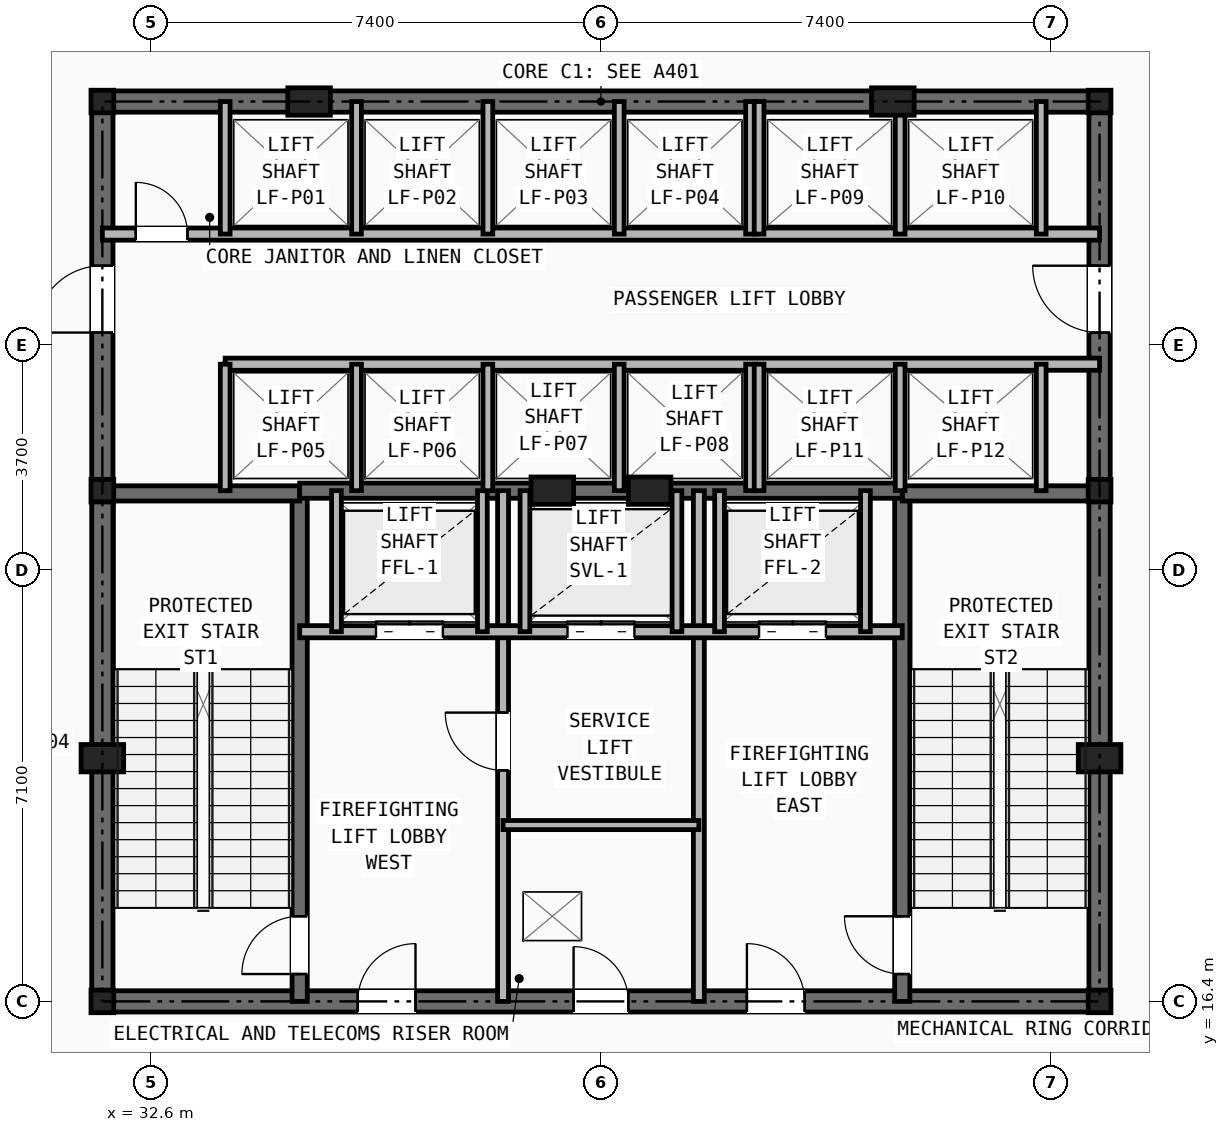
"""IFC4 building model, lengths in metres.
Left out: names, types, materials, properties, quantities, classifications, styles, units other than length and angle.
Written with IfcOpenShell. Run it as: python <this file> out.ifc"""

import sys

from ifc_helpers import new_model, si_unit, direction, frame, frame_2d, origin, origin_2d, place, context, subcontext, project, spatial, rectangle, i_section, extrude, element, fill, save


model = new_model("IFC4")
c1 = context("Model", 3, precision=1e-05, world=origin(), true_north=direction((0.0, 1.0)))
c2 = subcontext(c1, "Body", "Model", "MODEL_VIEW")
j1 = project(units=[si_unit("LENGTHUNIT", "METRE"), si_unit("PLANEANGLEUNIT", "RADIAN")], contexts=[c1])
p1 = place(None, origin())
s1 = spatial("IfcSite", under=j1, at=p1, CompositionType="ELEMENT")
p2 = place(p1, origin())
s2 = spatial("IfcBuilding", under=s1, at=p2, CompositionType="ELEMENT")
p3 = place(p2, frame((0.0, 0.0, 22.0)))
s3 = spatial("IfcBuildingStorey", under=s2, at=p3, CompositionType="ELEMENT", Elevation=22.0)
for number, where, z_axis, x_axis in (
    (1, (31.8, 16.4, 0.0), (0.0, 0.0, 1.0), (1.0, 0.0, 0.0)),
    (2, (48.2, 16.4, 0.0), (0.0, 0.0, 1.0), (1.0, 0.0, 0.0)),
    (3, (31.8, 24.8, 0.0), (0.0, 0.0, 1.0), (1.0, 0.0, 0.0)),
    (4, (48.2, 24.8, 0.0), (0.0, 0.0, 1.0), (1.0, 0.0, 0.0)),
    (5, (31.8, 31.2, 0.0), (0.0, 0.0, 1.0), (1.0, 0.0, 0.0)),
    (6, (48.2, 31.2, 0.0), (0.0, 0.0, 1.0), (1.0, 0.0, 0.0)),
):
    element("IfcColumn", number, at=place(p3, frame(where, z_axis=z_axis, x_axis=x_axis)), inside=s3, PredefinedType="COLUMN", context=c2, shape_type="SweptSolid", body=[
        extrude(i_section(OverallWidth=0.374, OverallDepth=0.372, WebThickness=0.016, FlangeThickness=0.026, at=origin_2d()), origin(), (0.0, 0.0, 1.0), 5.2),
    ])
for number, where, z_axis, x_axis in (
    (7, (31.8, 20.4, 0.0), (0.0, 0.0, 1.0), (1.0, 0.0, 0.0)),
    (8, (48.2, 20.4, 0.0), (0.0, 0.0, 1.0), (1.0, 0.0, 0.0)),
    (9, (35.2, 31.2, 0.0), (0.0, 0.0, 1.0), (1.0, 0.0, 0.0)),
    (10, (44.8, 31.2, 0.0), (0.0, 0.0, 1.0), (1.0, 0.0, 0.0)),
    (11, (39.2, 24.8, 0.0), (0.0, 0.0, 1.0), (1.0, 0.0, 0.0)),
    (12, (40.8, 24.8, 0.0), (0.0, 0.0, 1.0), (1.0, 0.0, 0.0)),
):
    element("IfcColumn", number, at=place(p3, frame(where, z_axis=z_axis, x_axis=x_axis)), inside=s3, PredefinedType="PILASTER", context=c2, shape_type="SweptSolid", body=[
        extrude(rectangle(XDim=0.7, YDim=0.45, at=origin_2d()), origin(), (0.0, 0.0, 1.0), 5.2),
    ])
p4 = place(p3, frame((31.8, 16.4, 0.0), z_axis=(0.0, 0.0, 1.0), x_axis=(1.0, 0.0, 0.0)))
e13 = element("IfcWall", 13, at=p4, inside=s3, PredefinedType="SHEAR", context=c2, shape_type="SweptSolid", body=[
    extrude(rectangle(XDim=16.4, YDim=0.35, at=frame_2d((8.2, 0.0))), origin(), (0.0, 0.0, 1.0), 4.78),
])
p5 = place(p4, frame((7.75, 0.0, 0.0)))
e14 = element("IfcOpeningElement", 14, at=p5, cuts=e13, PredefinedType="OPENING", context=c2, shape_type="SweptSolid", body=[
    extrude(rectangle(XDim=0.9, YDim=2.1, at=frame_2d((0.45, 1.05))), frame((0.0, 0.185, 0.0), z_axis=(0.0, -1.0, 0.0), x_axis=(1.0, 0.0, 0.0)), (0.0, 0.0, 1.0), 0.37),
])
p6 = place(p4, frame((4.2, 0.0, 0.0)))
e15 = element("IfcOpeningElement", 15, at=p6, cuts=e13, PredefinedType="OPENING", context=c2, shape_type="SweptSolid", body=[
    extrude(rectangle(XDim=0.95, YDim=2.1, at=frame_2d((0.475, 1.05))), frame((0.0, 0.185, 0.0), z_axis=(0.0, -1.0, 0.0), x_axis=(1.0, 0.0, 0.0)), (0.0, 0.0, 1.0), 0.37),
])
p7 = place(p4, frame((10.6, 0.0, 0.0)))
e16 = element("IfcOpeningElement", 16, at=p7, cuts=e13, PredefinedType="OPENING", context=c2, shape_type="SweptSolid", body=[
    extrude(rectangle(XDim=0.95, YDim=2.1, at=frame_2d((0.475, 1.05))), frame((0.0, 0.185, 0.0), z_axis=(0.0, -1.0, 0.0), x_axis=(1.0, 0.0, 0.0)), (0.0, 0.0, 1.0), 0.37),
])
p8 = place(p3, frame((31.8, 31.2, 0.0), z_axis=(0.0, 0.0, 1.0), x_axis=(1.0, 0.0, 0.0)))
e17 = element("IfcWall", 17, at=p8, inside=s3, PredefinedType="SHEAR", context=c2, shape_type="SweptSolid", body=[
    extrude(rectangle(XDim=16.4, YDim=0.35, at=frame_2d((8.2, 0.0))), origin(), (0.0, 0.0, 1.0), 4.78),
])
p9 = place(p3, frame((31.8, 16.4, 0.0), z_axis=(0.0, 0.0, 1.0), x_axis=(0.0, 1.0, 0.0)))
e18 = element("IfcWall", 18, at=p9, inside=s3, PredefinedType="SHEAR", context=c2, shape_type="SweptSolid", body=[
    extrude(rectangle(XDim=14.8, YDim=0.35, at=frame_2d((7.4, 0.0))), origin(), (0.0, 0.0, 1.0), 4.78),
])
p10 = place(p9, frame((11.0, 0.0, 0.0)))
e19 = element("IfcOpeningElement", 19, at=p10, cuts=e18, PredefinedType="OPENING", context=c2, shape_type="SweptSolid", body=[
    extrude(rectangle(XDim=1.1, YDim=2.15, at=frame_2d((0.55, 1.075))), frame((0.0, 0.185, 0.0), z_axis=(0.0, -1.0, 0.0), x_axis=(1.0, 0.0, 0.0)), (0.0, 0.0, 1.0), 0.37),
])
p11 = place(p3, frame((48.2, 16.4, 0.0), z_axis=(0.0, 0.0, 1.0), x_axis=(0.0, 1.0, 0.0)))
e20 = element("IfcWall", 20, at=p11, inside=s3, PredefinedType="SHEAR", context=c2, shape_type="SweptSolid", body=[
    extrude(rectangle(XDim=14.8, YDim=0.35, at=frame_2d((7.4, 0.0))), origin(), (0.0, 0.0, 1.0), 4.78),
])
p12 = place(p11, frame((11.0, 0.0, 0.0)))
e21 = element("IfcOpeningElement", 21, at=p12, cuts=e20, PredefinedType="OPENING", context=c2, shape_type="SweptSolid", body=[
    extrude(rectangle(XDim=1.1, YDim=2.15, at=frame_2d((0.55, 1.075))), frame((0.0, 0.185, 0.0), z_axis=(0.0, -1.0, 0.0), x_axis=(1.0, 0.0, 0.0)), (0.0, 0.0, 1.0), 0.37),
])
p13 = place(p3, frame((35.045, 16.4, 0.0), z_axis=(0.0, 0.0, 1.0), x_axis=(0.0, 1.0, 0.0)))
e22 = element("IfcWall", 22, at=p13, inside=s3, PredefinedType="SHEAR", context=c2, shape_type="SweptSolid", body=[
    extrude(rectangle(XDim=8.4, YDim=0.25, at=frame_2d((4.2, 0.0))), origin(), (0.0, 0.0, 1.0), 4.78),
])
p14 = place(p13, frame((0.45, 0.0, 0.0)))
e23 = element("IfcOpeningElement", 23, at=p14, cuts=e22, PredefinedType="OPENING", context=c2, shape_type="SweptSolid", body=[
    extrude(rectangle(XDim=0.95, YDim=2.1, at=frame_2d((0.475, 1.05))), frame((0.0, 0.135, 0.0), z_axis=(0.0, -1.0, 0.0), x_axis=(1.0, 0.0, 0.0)), (0.0, 0.0, 1.0), 0.27),
])
p15 = place(p3, frame((31.8, 24.755, 0.0), z_axis=(0.0, 0.0, 1.0), x_axis=(1.0, 0.0, 0.0)))
e24 = element("IfcWall", 24, at=p15, inside=s3, PredefinedType="SHEAR", context=c2, shape_type="SweptSolid", body=[
    extrude(rectangle(XDim=3.245, YDim=0.25, at=frame_2d((1.623, 0.0))), origin(), (0.0, 0.0, 1.0), 4.78),
])
p16 = place(p3, frame((44.955, 16.4, 0.0), z_axis=(0.0, 0.0, 1.0), x_axis=(0.0, 1.0, 0.0)))
e25 = element("IfcWall", 25, at=p16, inside=s3, PredefinedType="SHEAR", context=c2, shape_type="SweptSolid", body=[
    extrude(rectangle(XDim=8.4, YDim=0.25, at=frame_2d((4.2, 0.0))), origin(), (0.0, 0.0, 1.0), 4.78),
])
p17 = place(p16, frame((0.45, 0.0, 0.0)))
e26 = element("IfcOpeningElement", 26, at=p17, cuts=e25, PredefinedType="OPENING", context=c2, shape_type="SweptSolid", body=[
    extrude(rectangle(XDim=0.95, YDim=2.1, at=frame_2d((0.475, 1.05))), frame((0.0, 0.135, 0.0), z_axis=(0.0, -1.0, 0.0), x_axis=(1.0, 0.0, 0.0)), (0.0, 0.0, 1.0), 0.27),
])
p18 = place(p3, frame((44.955, 24.755, 0.0), z_axis=(0.0, 0.0, 1.0), x_axis=(1.0, 0.0, 0.0)))
e27 = element("IfcWall", 27, at=p18, inside=s3, PredefinedType="SHEAR", context=c2, shape_type="SweptSolid", body=[
    extrude(rectangle(XDim=3.245, YDim=0.25, at=frame_2d((1.623, 0.0))), origin(), (0.0, 0.0, 1.0), 4.78),
])
p19 = place(p3, frame((35.045, 24.8, 0.0), z_axis=(0.0, 0.0, 1.0), x_axis=(1.0, 0.0, 0.0)))
e28 = element("IfcWall", 28, at=p19, inside=s3, PredefinedType="SHEAR", context=c2, shape_type="SweptSolid", body=[
    extrude(rectangle(XDim=9.91, YDim=0.25, at=frame_2d((4.955, 0.0))), origin(), (0.0, 0.0, 1.0), 4.78),
])
p20 = place(p3, frame((38.39, 16.4, 0.0), z_axis=(0.0, 0.0, 1.0), x_axis=(0.0, 1.0, 0.0)))
e29 = element("IfcWall", 29, at=p20, inside=s3, PredefinedType="PARTITIONING", context=c2, shape_type="SweptSolid", body=[
    extrude(rectangle(XDim=8.4, YDim=0.18, at=frame_2d((4.2, 0.0))), origin(), (0.0, 0.0, 1.0), 2.52),
])
p21 = place(p20, frame((3.8, 0.0, 0.0)))
e30 = element("IfcOpeningElement", 30, at=p21, cuts=e29, PredefinedType="OPENING", context=c2, shape_type="SweptSolid", body=[
    extrude(rectangle(XDim=0.95, YDim=2.1, at=frame_2d((0.475, 1.05))), frame((0.0, 0.1, 0.0), z_axis=(0.0, -1.0, 0.0), x_axis=(1.0, 0.0, 0.0)), (0.0, 0.0, 1.0), 0.2),
])
p22 = place(p3, frame((41.61, 16.4, 0.0), z_axis=(0.0, 0.0, 1.0), x_axis=(0.0, 1.0, 0.0)))
e31 = element("IfcWall", 31, at=p22, inside=s3, PredefinedType="PARTITIONING", context=c2, shape_type="SweptSolid", body=[
    extrude(rectangle(XDim=8.4, YDim=0.18, at=frame_2d((4.2, 0.0))), origin(), (0.0, 0.0, 1.0), 2.52),
])
p23 = place(p3, frame((35.045, 22.48, 0.0), z_axis=(0.0, 0.0, 1.0), x_axis=(1.0, 0.0, 0.0)))
e32 = element("IfcWall", 32, at=p23, inside=s3, PredefinedType="SOLIDWALL", context=c2, shape_type="SweptSolid", body=[
    extrude(rectangle(XDim=9.91, YDim=0.2, at=frame_2d((4.955, 0.0))), origin(), (0.0, 0.0, 1.0), 4.78),
])
p24 = place(p23, frame((1.255, 0.0, 0.0)))
e33 = element("IfcOpeningElement", 33, at=p24, cuts=e32, PredefinedType="OPENING", context=c2, shape_type="SweptSolid", body=[
    extrude(rectangle(XDim=1.1, YDim=2.15, at=frame_2d((0.55, 1.075))), frame((0.0, 0.11, 0.0), z_axis=(0.0, -1.0, 0.0), x_axis=(1.0, 0.0, 0.0)), (0.0, 0.0, 1.0), 0.22),
])
p25 = place(p23, frame((7.555, 0.0, 0.0)))
e34 = element("IfcOpeningElement", 34, at=p25, cuts=e32, PredefinedType="OPENING", context=c2, shape_type="SweptSolid", body=[
    extrude(rectangle(XDim=1.1, YDim=2.15, at=frame_2d((0.55, 1.075))), frame((0.0, 0.11, 0.0), z_axis=(0.0, -1.0, 0.0), x_axis=(1.0, 0.0, 0.0)), (0.0, 0.0, 1.0), 0.22),
])
p26 = place(p23, frame((4.405, 0.0, 0.0)))
e35 = element("IfcOpeningElement", 35, at=p26, cuts=e32, PredefinedType="OPENING", context=c2, shape_type="SweptSolid", body=[
    extrude(rectangle(XDim=1.1, YDim=2.15, at=frame_2d((0.55, 1.075))), frame((0.0, 0.11, 0.0), z_axis=(0.0, -1.0, 0.0), x_axis=(1.0, 0.0, 0.0)), (0.0, 0.0, 1.0), 0.22),
])
p27 = place(p3, frame((38.39, 19.3, 0.0), z_axis=(0.0, 0.0, 1.0), x_axis=(1.0, 0.0, 0.0)))
e36 = element("IfcWall", 36, at=p27, inside=s3, PredefinedType="PARTITIONING", context=c2, shape_type="SweptSolid", body=[
    extrude(rectangle(XDim=3.22, YDim=0.15, at=frame_2d((1.61, 0.0))), origin(), (0.0, 0.0, 1.0), 4.78),
])
for number, where, z_axis, x_axis in (
    (37, (35.65, 22.48, 0.0), (0.0, 0.0, 1.0), (0.0, 1.0, 0.0)),
    (38, (38.05, 22.48, 0.0), (0.0, 0.0, 1.0), (0.0, 1.0, 0.0)),
    (39, (41.95, 22.48, 0.0), (0.0, 0.0, 1.0), (0.0, 1.0, 0.0)),
    (40, (44.35, 22.48, 0.0), (0.0, 0.0, 1.0), (0.0, 1.0, 0.0)),
    (41, (38.75, 22.48, 0.0), (0.0, 0.0, 1.0), (0.0, 1.0, 0.0)),
    (42, (41.25, 22.48, 0.0), (0.0, 0.0, 1.0), (0.0, 1.0, 0.0)),
):
    element("IfcWall", number, at=place(p3, frame(where, z_axis=z_axis, x_axis=x_axis)), inside=s3, PredefinedType="SOLIDWALL", context=c2, shape_type="SweptSolid", body=[
        extrude(rectangle(XDim=2.32, YDim=0.16, at=frame_2d((1.16, 0.0))), origin(), (0.0, 0.0, 1.0), 4.78),
    ])
p28 = place(p3, frame((31.8, 29.02, 0.0), z_axis=(0.0, 0.0, 1.0), x_axis=(1.0, 0.0, 0.0)))
e43 = element("IfcWall", 43, at=p28, inside=s3, PredefinedType="SOLIDWALL", context=c2, shape_type="SweptSolid", body=[
    extrude(rectangle(XDim=16.4, YDim=0.2, at=frame_2d((8.2, 0.0))), origin(), (0.0, 0.0, 1.0), 4.78),
])
p29 = place(p28, frame((0.55, 0.0, 0.0)))
e44 = element("IfcOpeningElement", 44, at=p29, cuts=e43, PredefinedType="OPENING", context=c2, shape_type="SweptSolid", body=[
    extrude(rectangle(XDim=0.85, YDim=2.05, at=frame_2d((0.425, 1.025))), frame((0.0, 0.11, 0.0), z_axis=(0.0, -1.0, 0.0), x_axis=(1.0, 0.0, 0.0)), (0.0, 0.0, 1.0), 0.22),
])
p30 = place(p3, frame((33.82, 26.88, 0.0), z_axis=(0.0, 0.0, 1.0), x_axis=(1.0, 0.0, 0.0)))
e45 = element("IfcWall", 45, at=p30, inside=s3, PredefinedType="SOLIDWALL", context=c2, shape_type="SweptSolid", body=[
    extrude(rectangle(XDim=14.38, YDim=0.2, at=frame_2d((7.19, 0.0))), origin(), (0.0, 0.0, 1.0), 4.78),
])
p31 = place(p3, frame((33.82, 29.02, 0.0), z_axis=(0.0, 0.0, 1.0), x_axis=(0.0, 1.0, 0.0)))
e46 = element("IfcWall", 46, at=p31, inside=s3, PredefinedType="SOLIDWALL", context=c2, shape_type="SweptSolid", body=[
    extrude(rectangle(XDim=2.18, YDim=0.16, at=frame_2d((1.09, 0.0))), origin(), (0.0, 0.0, 1.0), 2.52),
])
p32 = place(p3, frame((33.82, 24.8, 0.0), z_axis=(0.0, 0.0, 1.0), x_axis=(0.0, 1.0, 0.0)))
e47 = element("IfcWall", 47, at=p32, inside=s3, PredefinedType="SOLIDWALL", context=c2, shape_type="SweptSolid", body=[
    extrude(rectangle(XDim=2.08, YDim=0.16, at=frame_2d((1.04, 0.0))), origin(), (0.0, 0.0, 1.0), 4.78),
])
for number, where, z_axis, x_axis in (
    (48, (35.98, 29.02, 0.0), (0.0, 0.0, 1.0), (0.0, 1.0, 0.0)),
    (49, (38.14, 29.02, 0.0), (0.0, 0.0, 1.0), (0.0, 1.0, 0.0)),
    (50, (40.3, 29.02, 0.0), (0.0, 0.0, 1.0), (0.0, 1.0, 0.0)),
    (51, (42.46, 29.02, 0.0), (0.0, 0.0, 1.0), (0.0, 1.0, 0.0)),
):
    element("IfcWall", number, at=place(p3, frame(where, z_axis=z_axis, x_axis=x_axis)), inside=s3, PredefinedType="SOLIDWALL", context=c2, shape_type="SweptSolid", body=[
        extrude(rectangle(XDim=2.18, YDim=0.16, at=frame_2d((1.09, 0.0))), origin(), (0.0, 0.0, 1.0), 2.52),
    ])
for number, where, z_axis, x_axis in (
    (52, (35.98, 24.8, 0.0), (0.0, 0.0, 1.0), (0.0, 1.0, 0.0)),
    (53, (38.14, 24.8, 0.0), (0.0, 0.0, 1.0), (0.0, 1.0, 0.0)),
    (54, (40.3, 24.8, 0.0), (0.0, 0.0, 1.0), (0.0, 1.0, 0.0)),
    (55, (42.46, 24.8, 0.0), (0.0, 0.0, 1.0), (0.0, 1.0, 0.0)),
):
    element("IfcWall", number, at=place(p3, frame(where, z_axis=z_axis, x_axis=x_axis)), inside=s3, PredefinedType="SOLIDWALL", context=c2, shape_type="SweptSolid", body=[
        extrude(rectangle(XDim=2.08, YDim=0.16, at=frame_2d((1.04, 0.0))), origin(), (0.0, 0.0, 1.0), 4.78),
    ])
for number, where, z_axis, x_axis in (
    (56, (42.6, 29.02, 0.0), (0.0, 0.0, 1.0), (0.0, 1.0, 0.0)),
    (57, (44.92, 29.02, 0.0), (0.0, 0.0, 1.0), (0.0, 1.0, 0.0)),
    (58, (47.24, 29.02, 0.0), (0.0, 0.0, 1.0), (0.0, 1.0, 0.0)),
):
    element("IfcWall", number, at=place(p3, frame(where, z_axis=z_axis, x_axis=x_axis)), inside=s3, PredefinedType="SOLIDWALL", context=c2, shape_type="SweptSolid", body=[
        extrude(rectangle(XDim=2.18, YDim=0.16, at=frame_2d((1.09, 0.0))), origin(), (0.0, 0.0, 1.0), 2.52),
    ])
for number, where, z_axis, x_axis in (
    (59, (42.6, 24.8, 0.0), (0.0, 0.0, 1.0), (0.0, 1.0, 0.0)),
    (60, (44.92, 24.8, 0.0), (0.0, 0.0, 1.0), (0.0, 1.0, 0.0)),
    (61, (47.24, 24.8, 0.0), (0.0, 0.0, 1.0), (0.0, 1.0, 0.0)),
):
    element("IfcWall", number, at=place(p3, frame(where, z_axis=z_axis, x_axis=x_axis)), inside=s3, PredefinedType="SOLIDWALL", context=c2, shape_type="SweptSolid", body=[
        extrude(rectangle(XDim=2.08, YDim=0.16, at=frame_2d((1.04, 0.0))), origin(), (0.0, 0.0, 1.0), 4.78),
    ])
p33 = place(p5, origin())
e62 = element("IfcDoor", 62, at=p33, inside=s3, OperationType="SINGLE_SWING_LEFT", PredefinedType="DOOR", context=c2, shape_type="SweptSolid", body=[
    extrude(rectangle(XDim=0.9, YDim=2.1, at=frame_2d((0.45, 1.05))), frame((0.0, 0.025, 0.0), z_axis=(0.0, -1.0, 0.0), x_axis=(1.0, 0.0, 0.0)), (0.0, 0.0, 1.0), 0.05),
])
fill(e14, e62)
p34 = place(p21, origin())
e63 = element("IfcDoor", 63, at=p34, inside=s3, OperationType="SINGLE_SWING_RIGHT", PredefinedType="DOOR", context=c2, shape_type="SweptSolid", body=[
    extrude(rectangle(XDim=0.95, YDim=2.1, at=frame_2d((0.475, 1.05))), frame((0.0, 0.025, 0.0), z_axis=(0.0, -1.0, 0.0), x_axis=(1.0, 0.0, 0.0)), (0.0, 0.0, 1.0), 0.05),
])
fill(e30, e63)
p35 = place(p14, origin())
e64 = element("IfcDoor", 64, at=p35, inside=s3, OperationType="SINGLE_SWING_LEFT", PredefinedType="DOOR", context=c2, shape_type="SweptSolid", body=[
    extrude(rectangle(XDim=0.95, YDim=2.1, at=frame_2d((0.475, 1.05))), frame((0.0, 0.025, 0.0), z_axis=(0.0, -1.0, 0.0), x_axis=(1.0, 0.0, 0.0)), (0.0, 0.0, 1.0), 0.05),
])
fill(e23, e64)
p36 = place(p17, origin())
e65 = element("IfcDoor", 65, at=p36, inside=s3, OperationType="SINGLE_SWING_RIGHT", PredefinedType="DOOR", context=c2, shape_type="SweptSolid", body=[
    extrude(rectangle(XDim=0.95, YDim=2.1, at=frame_2d((0.475, 1.05))), frame((0.0, 0.025, 0.0), z_axis=(0.0, -1.0, 0.0), x_axis=(1.0, 0.0, 0.0)), (0.0, 0.0, 1.0), 0.05),
])
fill(e26, e65)
p37 = place(p6, origin())
e66 = element("IfcDoor", 66, at=p37, inside=s3, OperationType="SINGLE_SWING_RIGHT", PredefinedType="DOOR", context=c2, shape_type="SweptSolid", body=[
    extrude(rectangle(XDim=0.95, YDim=2.1, at=frame_2d((0.475, 1.05))), frame((0.0, 0.025, 0.0), z_axis=(0.0, -1.0, 0.0), x_axis=(1.0, 0.0, 0.0)), (0.0, 0.0, 1.0), 0.05),
])
fill(e15, e66)
p38 = place(p7, origin())
e67 = element("IfcDoor", 67, at=p38, inside=s3, OperationType="SINGLE_SWING_LEFT", PredefinedType="DOOR", context=c2, shape_type="SweptSolid", body=[
    extrude(rectangle(XDim=0.95, YDim=2.1, at=frame_2d((0.475, 1.05))), frame((0.0, 0.025, 0.0), z_axis=(0.0, -1.0, 0.0), x_axis=(1.0, 0.0, 0.0)), (0.0, 0.0, 1.0), 0.05),
])
fill(e16, e67)
p39 = place(p24, origin())
e68 = element("IfcDoor", 68, at=p39, inside=s3, OperationType="DOUBLE_DOOR_SLIDING", PredefinedType="DOOR", context=c2, shape_type="SweptSolid", body=[
    extrude(rectangle(XDim=1.1, YDim=2.15, at=frame_2d((0.55, 1.075))), frame((0.0, 0.025, 0.0), z_axis=(0.0, -1.0, 0.0), x_axis=(1.0, 0.0, 0.0)), (0.0, 0.0, 1.0), 0.05),
])
fill(e33, e68)
p40 = place(p25, origin())
e69 = element("IfcDoor", 69, at=p40, inside=s3, OperationType="DOUBLE_DOOR_SLIDING", PredefinedType="DOOR", context=c2, shape_type="SweptSolid", body=[
    extrude(rectangle(XDim=1.1, YDim=2.15, at=frame_2d((0.55, 1.075))), frame((0.0, 0.025, 0.0), z_axis=(0.0, -1.0, 0.0), x_axis=(1.0, 0.0, 0.0)), (0.0, 0.0, 1.0), 0.05),
])
fill(e34, e69)
p41 = place(p26, origin())
e70 = element("IfcDoor", 70, at=p41, inside=s3, OperationType="DOUBLE_DOOR_SLIDING", PredefinedType="DOOR", context=c2, shape_type="SweptSolid", body=[
    extrude(rectangle(XDim=1.1, YDim=2.15, at=frame_2d((0.55, 1.075))), frame((0.0, 0.025, 0.0), z_axis=(0.0, -1.0, 0.0), x_axis=(1.0, 0.0, 0.0)), (0.0, 0.0, 1.0), 0.05),
])
fill(e35, e70)
p42 = place(p29, origin())
e71 = element("IfcDoor", 71, at=p42, inside=s3, OperationType="SINGLE_SWING_LEFT", PredefinedType="DOOR", context=c2, shape_type="SweptSolid", body=[
    extrude(rectangle(XDim=0.85, YDim=2.05, at=frame_2d((0.425, 1.025))), frame((0.0, 0.025, 0.0), z_axis=(0.0, -1.0, 0.0), x_axis=(1.0, 0.0, 0.0)), (0.0, 0.0, 1.0), 0.05),
])
fill(e44, e71)
p43 = place(p10, origin())
e72 = element("IfcDoor", 72, at=p43, inside=s3, OperationType="SINGLE_SWING_LEFT", PredefinedType="DOOR", context=c2, shape_type="SweptSolid", body=[
    extrude(rectangle(XDim=1.1, YDim=2.15, at=frame_2d((0.55, 1.075))), frame((0.0, 0.025, 0.0), z_axis=(0.0, -1.0, 0.0), x_axis=(1.0, 0.0, 0.0)), (0.0, 0.0, 1.0), 0.05),
])
fill(e19, e72)
p44 = place(p12, origin())
e73 = element("IfcDoor", 73, at=p44, inside=s3, OperationType="SINGLE_SWING_RIGHT", PredefinedType="DOOR", context=c2, shape_type="SweptSolid", body=[
    extrude(rectangle(XDim=1.1, YDim=2.15, at=frame_2d((0.55, 1.075))), frame((0.0, 0.025, 0.0), z_axis=(0.0, -1.0, 0.0), x_axis=(1.0, 0.0, 0.0)), (0.0, 0.0, 1.0), 0.05),
])
fill(e21, e73)
save(model, sys.argv[1])
